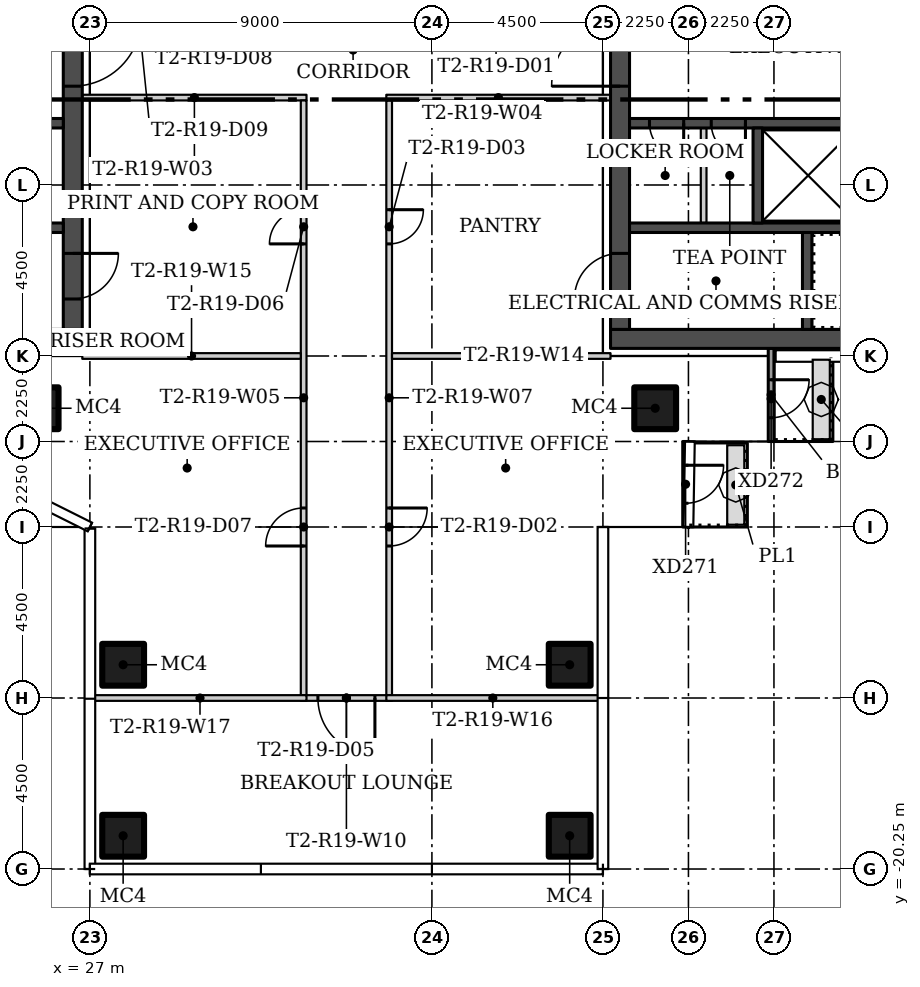
"""IFC4 building model, lengths in metres.
Left out: names, types, materials, properties, quantities, classifications, styles, units other than length and angle.
Written with IfcOpenShell. Run it as: python <this file> out.ifc"""

import sys

from ifc_helpers import new_model, si_unit, direction, frame, frame_2d, origin, origin_2d, place, context, subcontext, project, spatial, rectangle, hollow_rectangle, extrude, element, fill, save


model = new_model("IFC4")
c1 = context("Model", 3, precision=1e-05, world=origin(), true_north=direction((0.0, 1.0)))
c2 = subcontext(c1, "Body", "Model", "MODEL_VIEW")
j1 = project(units=[si_unit("LENGTHUNIT", "METRE"), si_unit("PLANEANGLEUNIT", "RADIAN")], contexts=[c1])
p1 = place(None, origin())
s1 = spatial("IfcSite", under=j1, at=p1, CompositionType="ELEMENT")
p2 = place(p1, origin())
s2 = spatial("IfcBuilding", under=s1, at=p2, CompositionType="ELEMENT")
p3 = place(p2, frame((0.0, 0.0, 174.0)))
s3 = spatial("IfcBuildingStorey", under=s2, at=p3, CompositionType="ELEMENT", Elevation=174.0)
for number, where in (
    (1, (25.625, -8.125, 0.0)),
    (2, (41.875, -8.125, 0.0)),
    (3, (39.625, -14.875, 0.0)),
    (4, (39.625, -19.375, 0.0)),
    (5, (27.875, -14.875, 0.0)),
    (6, (27.875, -19.375, 0.0)),
):
    element("IfcColumn", number, at=place(p3, frame(where)), inside=s3, PredefinedType="COLUMN", context=c2, shape_type="SweptSolid", body=[
        extrude(hollow_rectangle(XDim=1.1, YDim=1.1, WallThickness=0.04, at=origin_2d()), origin(), (0.0, 0.0, 1.0), 3.45),
    ])
for number, where, z_axis, x_axis in (
    (7, (32.7, 0.05, 0.0), (0.0, 0.0, 1.0), (-1.0, 0.0, 0.0)),
    (8, (40.7, 0.05, 0.0), (0.0, 0.0, 1.0), (-1.0, 0.0, 0.0)),
):
    element("IfcWall", number, at=place(p3, frame(where, z_axis=z_axis, x_axis=x_axis)), inside=s3, PredefinedType="PARTITIONING", context=c2, shape_type="SweptSolid", body=[
        extrude(rectangle(XDim=5.9, YDim=0.15, at=frame_2d((2.95, 0.0))), origin(), (0.0, 0.0, 1.0), 3.45),
    ])
p4 = place(p3, frame((32.625, -15.675, 0.0), z_axis=(0.0, 0.0, 1.0), x_axis=(0.0, 1.0, 0.0)))
e9 = element("IfcWall", 9, at=p4, inside=s3, PredefinedType="PARTITIONING", context=c2, shape_type="SweptSolid", body=[
    extrude(rectangle(XDim=15.65, YDim=0.15, at=frame_2d((7.825, 0.0))), origin(), (0.0, 0.0, 1.0), 3.45),
])
p5 = place(p4, frame((11.875, 0.0, 0.0)))
e10 = element("IfcOpeningElement", 10, at=p5, cuts=e9, PredefinedType="OPENING", context=c2, shape_type="SweptSolid", body=[
    extrude(rectangle(XDim=0.9, YDim=2.1, at=frame_2d((0.45, 1.05))), frame((0.0, 0.085, 0.0), z_axis=(0.0, -1.0, 0.0), x_axis=(1.0, 0.0, 0.0)), (0.0, 0.0, 1.0), 0.17),
])
p6 = place(p4, frame((3.925, 0.0, 0.0)))
e11 = element("IfcOpeningElement", 11, at=p6, cuts=e9, PredefinedType="OPENING", context=c2, shape_type="SweptSolid", body=[
    extrude(rectangle(XDim=1.0, YDim=2.4, at=frame_2d((0.5, 1.2))), frame((0.0, 0.085, 0.0), z_axis=(0.0, -1.0, 0.0), x_axis=(1.0, 0.0, 0.0)), (0.0, 0.0, 1.0), 0.17),
])
p7 = place(p3, frame((34.875, -0.025, 0.0), z_axis=(0.0, 0.0, 1.0), x_axis=(0.0, -1.0, 0.0)))
e12 = element("IfcWall", 12, at=p7, inside=s3, PredefinedType="PARTITIONING", context=c2, shape_type="SweptSolid", body=[
    extrude(rectangle(XDim=15.65, YDim=0.15, at=frame_2d((7.825, 0.0))), origin(), (0.0, 0.0, 1.0), 3.45),
])
p8 = place(p7, frame((10.725, 0.0, 0.0)))
e13 = element("IfcOpeningElement", 13, at=p8, cuts=e12, PredefinedType="OPENING", context=c2, shape_type="SweptSolid", body=[
    extrude(rectangle(XDim=1.0, YDim=2.4, at=frame_2d((0.5, 1.2))), frame((0.0, 0.085, 0.0), z_axis=(0.0, -1.0, 0.0), x_axis=(1.0, 0.0, 0.0)), (0.0, 0.0, 1.0), 0.17),
])
p9 = place(p7, frame((2.875, 0.0, 0.0)))
e14 = element("IfcOpeningElement", 14, at=p9, cuts=e12, PredefinedType="OPENING", context=c2, shape_type="SweptSolid", body=[
    extrude(rectangle(XDim=0.9, YDim=2.1, at=frame_2d((0.45, 1.05))), frame((0.0, 0.085, 0.0), z_axis=(0.0, -1.0, 0.0), x_axis=(1.0, 0.0, 0.0)), (0.0, 0.0, 1.0), 0.17),
])
p10 = place(p3, frame((34.95, -15.75, 0.0), z_axis=(0.0, 0.0, 1.0), x_axis=(-1.0, 0.0, 0.0)))
e15 = element("IfcWall", 15, at=p10, inside=s3, PredefinedType="PARTITIONING", context=c2, shape_type="SweptSolid", body=[
    extrude(rectangle(XDim=2.4, YDim=0.15, at=frame_2d((1.2, 0.0))), origin(), (0.0, 0.0, 1.0), 3.45),
])
p11 = place(p10, frame((0.45, 0.0, 0.0)))
e16 = element("IfcOpeningElement", 16, at=p11, cuts=e15, PredefinedType="OPENING", context=c2, shape_type="SweptSolid", body=[
    extrude(rectangle(XDim=1.5, YDim=2.1, at=frame_2d((0.75, 1.05))), frame((0.0, 0.085, 0.0), z_axis=(0.0, -1.0, 0.0), x_axis=(1.0, 0.0, 0.0)), (0.0, 0.0, 1.0), 0.17),
])
for number, where in (
    (17, (34.95, -6.75, 0.0)),
    (18, (26.8, -6.75, 0.0)),
):
    element("IfcWall", number, at=place(p3, frame(where)), inside=s3, PredefinedType="PARTITIONING", context=c2, shape_type="SweptSolid", body=[
        extrude(rectangle(XDim=5.75, YDim=0.15, at=frame_2d((2.875, 0.0))), origin(), (0.0, 0.0, 1.0), 3.45),
    ])
for number, where in (
    (19, (34.8, -15.75, 0.0)),
    (20, (27.095, -15.75, 0.0)),
):
    element("IfcWall", number, at=place(p3, frame(where)), inside=s3, PredefinedType="PARTITIONING", context=c2, shape_type="SweptSolid", body=[
        extrude(rectangle(XDim=5.605, YDim=0.15, at=frame_2d((2.802, 0.0))), origin(), (0.0, 0.0, 1.0), 3.45),
    ])
p12 = place(p3, frame((42.675, -9.0, 0.0), z_axis=(0.0, 0.0, 1.0), x_axis=(0.0, -1.0, 0.0)))
e21 = element("IfcWall", 21, at=p12, inside=s3, PredefinedType="SOLIDWALL", context=c2, shape_type="SweptSolid", body=[
    extrude(rectangle(XDim=2.25, YDim=0.15, at=frame_2d((1.125, 0.0))), origin(), (0.0, 0.0, 1.0), 3.45),
])
p13 = place(p12, frame((0.625, 0.0, 0.0)))
e22 = element("IfcOpeningElement", 22, at=p13, cuts=e21, PredefinedType="OPENING", context=c2, shape_type="SweptSolid", body=[
    extrude(rectangle(XDim=1.0, YDim=2.4, at=frame_2d((0.5, 1.2))), frame((0.0, 0.085, 0.0), z_axis=(0.0, -1.0, 0.0), x_axis=(1.0, 0.0, 0.0)), (0.0, 0.0, 1.0), 0.17),
])
p14 = place(p3, frame((44.925, -6.543, 0.0), z_axis=(0.0, 0.0, 1.0), x_axis=(0.0, -1.0, 0.0)))
e23 = element("IfcWall", 23, at=p14, inside=s3, PredefinedType="SOLIDWALL", context=c2, shape_type="SweptSolid", body=[
    extrude(rectangle(XDim=2.457, YDim=0.15, at=frame_2d((1.229, 0.0))), origin(), (0.0, 0.0, 1.0), 3.45),
])
p15 = place(p14, frame((0.832, 0.0, 0.0)))
e24 = element("IfcOpeningElement", 24, at=p15, cuts=e23, PredefinedType="OPENING", context=c2, shape_type="SweptSolid", body=[
    extrude(rectangle(XDim=1.0, YDim=2.4, at=frame_2d((0.5, 1.2))), frame((0.0, 0.085, 0.0), z_axis=(0.0, -1.0, 0.0), x_axis=(1.0, 0.0, 0.0)), (0.0, 0.0, 1.0), 0.17),
])
p16 = place(p3, frame((13.7, -6.3, 0.0)))
e25 = element("IfcWall", 25, at=p16, inside=s3, PredefinedType="SHEAR", context=c2, shape_type="SweptSolid", body=[
    extrude(rectangle(XDim=13.1, YDim=0.5, at=frame_2d((6.55, 0.0))), origin(), (0.0, 0.0, 1.0), 3.45),
])
p17 = place(p3, frame((26.55, 6.05, 0.0), z_axis=(0.0, 0.0, 1.0), x_axis=(0.0, -1.0, 0.0)))
e26 = element("IfcWall", 26, at=p17, inside=s3, PredefinedType="SHEAR", context=c2, shape_type="SweptSolid", body=[
    extrude(rectangle(XDim=12.1, YDim=0.5, at=frame_2d((6.05, 0.0))), origin(), (0.0, 0.0, 1.0), 3.45),
])
p18 = place(p17, frame((10.1, 0.0, 0.0)))
e27 = element("IfcOpeningElement", 27, at=p18, cuts=e26, PredefinedType="OPENING", context=c2, shape_type="SweptSolid", body=[
    extrude(rectangle(XDim=1.2, YDim=2.1, at=frame_2d((0.6, 1.05))), frame((0.0, 0.26, 0.0), z_axis=(0.0, -1.0, 0.0), x_axis=(1.0, 0.0, 0.0)), (0.0, 0.0, 1.0), 0.52),
])
p19 = place(p17, frame((3.9, 0.0, 0.0)))
e28 = element("IfcOpeningElement", 28, at=p19, cuts=e26, PredefinedType="OPENING", context=c2, shape_type="SweptSolid", body=[
    extrude(rectangle(XDim=1.8, YDim=2.4, at=frame_2d((0.9, 1.2))), frame((0.0, 0.26, 0.0), z_axis=(0.0, -1.0, 0.0), x_axis=(1.0, 0.0, 0.0)), (0.0, 0.0, 1.0), 0.52),
])
p20 = place(p3, frame((26.3, -3.375, 0.0), z_axis=(0.0, 0.0, 1.0), x_axis=(-1.0, 0.0, 0.0)))
e29 = element("IfcWall", 29, at=p20, inside=s3, PredefinedType="SHEAR", context=c2, shape_type="SweptSolid", body=[
    extrude(rectangle(XDim=12.1, YDim=0.25, at=frame_2d((6.05, 0.0))), origin(), (0.0, 0.0, 1.0), 3.45),
])
p21 = place(p20, frame((10.95, 0.0, 0.0)))
e30 = element("IfcOpeningElement", 30, at=p21, cuts=e29, PredefinedType="OPENING", context=c2, shape_type="SweptSolid", body=[
    extrude(rectangle(XDim=1.1, YDim=2.1, at=frame_2d((0.55, 1.05))), frame((0.0, 0.135, 0.0), z_axis=(0.0, -1.0, 0.0), x_axis=(1.0, 0.0, 0.0)), (0.0, 0.0, 1.0), 0.27),
])
p22 = place(p3, frame((26.3, -0.625, 0.0), z_axis=(0.0, 0.0, 1.0), x_axis=(-1.0, 0.0, 0.0)))
e31 = element("IfcWall", 31, at=p22, inside=s3, PredefinedType="SHEAR", context=c2, shape_type="SweptSolid", body=[
    extrude(rectangle(XDim=12.1, YDim=0.25, at=frame_2d((6.05, 0.0))), origin(), (0.0, 0.0, 1.0), 3.45),
])
p23 = place(p22, frame((8.65, 0.0, 0.0)))
e32 = element("IfcOpeningElement", 32, at=p23, cuts=e31, PredefinedType="OPENING", context=c2, shape_type="SweptSolid", body=[
    extrude(rectangle(XDim=1.2, YDim=2.1, at=frame_2d((0.6, 1.05))), frame((0.0, 0.135, 0.0), z_axis=(0.0, -1.0, 0.0), x_axis=(1.0, 0.0, 0.0)), (0.0, 0.0, 1.0), 0.27),
])
p24 = place(p22, frame((2.0, 0.0, 0.0)))
e33 = element("IfcOpeningElement", 33, at=p24, cuts=e31, PredefinedType="OPENING", context=c2, shape_type="SweptSolid", body=[
    extrude(rectangle(XDim=0.9, YDim=2.1, at=frame_2d((0.45, 1.05))), frame((0.0, 0.135, 0.0), z_axis=(0.0, -1.0, 0.0), x_axis=(1.0, 0.0, 0.0)), (0.0, 0.0, 1.0), 0.27),
])
p25 = place(p22, frame((0.375, 0.0, 0.0)))
e34 = element("IfcOpeningElement", 34, at=p25, cuts=e31, PredefinedType="OPENING", context=c2, shape_type="SweptSolid", body=[
    extrude(rectangle(XDim=0.9, YDim=2.1, at=frame_2d((0.45, 1.05))), frame((0.0, 0.135, 0.0), z_axis=(0.0, -1.0, 0.0), x_axis=(1.0, 0.0, 0.0)), (0.0, 0.0, 1.0), 0.27),
])
p26 = place(p3, frame((53.8, -6.3, 0.0), z_axis=(0.0, 0.0, 1.0), x_axis=(-1.0, 0.0, 0.0)))
e35 = element("IfcWall", 35, at=p26, inside=s3, PredefinedType="SHEAR", context=c2, shape_type="SweptSolid", body=[
    extrude(rectangle(XDim=13.1, YDim=0.5, at=frame_2d((6.55, 0.0))), origin(), (0.0, 0.0, 1.0), 3.45),
])
p27 = place(p3, frame((40.95, -6.05, 0.0), z_axis=(0.0, 0.0, 1.0), x_axis=(0.0, 1.0, 0.0)))
e36 = element("IfcWall", 36, at=p27, inside=s3, PredefinedType="SHEAR", context=c2, shape_type="SweptSolid", body=[
    extrude(rectangle(XDim=12.1, YDim=0.5, at=frame_2d((6.05, 0.0))), origin(), (0.0, 0.0, 1.0), 3.45),
])
p28 = place(p27, frame((0.8, 0.0, 0.0)))
e37 = element("IfcOpeningElement", 37, at=p28, cuts=e36, PredefinedType="OPENING", context=c2, shape_type="SweptSolid", body=[
    extrude(rectangle(XDim=1.2, YDim=2.1, at=frame_2d((0.6, 1.05))), frame((0.0, 0.26, 0.0), z_axis=(0.0, -1.0, 0.0), x_axis=(1.0, 0.0, 0.0)), (0.0, 0.0, 1.0), 0.52),
])
p29 = place(p27, frame((6.4, 0.0, 0.0)))
e38 = element("IfcOpeningElement", 38, at=p29, cuts=e36, PredefinedType="OPENING", context=c2, shape_type="SweptSolid", body=[
    extrude(rectangle(XDim=1.8, YDim=2.4, at=frame_2d((0.9, 1.2))), frame((0.0, 0.26, 0.0), z_axis=(0.0, -1.0, 0.0), x_axis=(1.0, 0.0, 0.0)), (0.0, 0.0, 1.0), 0.52),
])
p30 = place(p3, frame((53.3, -3.375, 0.0), z_axis=(0.0, 0.0, 1.0), x_axis=(-1.0, 0.0, 0.0)))
e39 = element("IfcWall", 39, at=p30, inside=s3, PredefinedType="SHEAR", context=c2, shape_type="SweptSolid", body=[
    extrude(rectangle(XDim=12.1, YDim=0.25, at=frame_2d((6.05, 0.0))), origin(), (0.0, 0.0, 1.0), 3.45),
])
p31 = place(p30, frame((0.05, 0.0, 0.0)))
e40 = element("IfcOpeningElement", 40, at=p31, cuts=e39, PredefinedType="OPENING", context=c2, shape_type="SweptSolid", body=[
    extrude(rectangle(XDim=1.1, YDim=2.1, at=frame_2d((0.55, 1.05))), frame((0.0, 0.135, 0.0), z_axis=(0.0, -1.0, 0.0), x_axis=(1.0, 0.0, 0.0)), (0.0, 0.0, 1.0), 0.27),
])
p32 = place(p3, frame((45.875, -6.05, 0.0), z_axis=(0.0, 0.0, 1.0), x_axis=(0.0, 1.0, 0.0)))
e41 = element("IfcWall", 41, at=p32, inside=s3, PredefinedType="SHEAR", context=c2, shape_type="SweptSolid", body=[
    extrude(rectangle(XDim=2.55, YDim=0.25, at=frame_2d((1.275, 0.0))), origin(), (0.0, 0.0, 1.0), 3.45),
])
p33 = place(p3, frame((53.3, -0.625, 0.0), z_axis=(0.0, 0.0, 1.0), x_axis=(-1.0, 0.0, 0.0)))
e42 = element("IfcWall", 42, at=p33, inside=s3, PredefinedType="SHEAR", context=c2, shape_type="SweptSolid", body=[
    extrude(rectangle(XDim=12.1, YDim=0.25, at=frame_2d((6.05, 0.0))), origin(), (0.0, 0.0, 1.0), 3.45),
])
p34 = place(p33, frame((2.25, 0.0, 0.0)))
e43 = element("IfcOpeningElement", 43, at=p34, cuts=e42, PredefinedType="OPENING", context=c2, shape_type="SweptSolid", body=[
    extrude(rectangle(XDim=1.2, YDim=2.1, at=frame_2d((0.6, 1.05))), frame((0.0, 0.135, 0.0), z_axis=(0.0, -1.0, 0.0), x_axis=(1.0, 0.0, 0.0)), (0.0, 0.0, 1.0), 0.27),
])
p35 = place(p33, frame((9.05, 0.0, 0.0)))
e44 = element("IfcOpeningElement", 44, at=p35, cuts=e42, PredefinedType="OPENING", context=c2, shape_type="SweptSolid", body=[
    extrude(rectangle(XDim=0.9, YDim=2.1, at=frame_2d((0.45, 1.05))), frame((0.0, 0.135, 0.0), z_axis=(0.0, -1.0, 0.0), x_axis=(1.0, 0.0, 0.0)), (0.0, 0.0, 1.0), 0.27),
])
p36 = place(p33, frame((10.675, 0.0, 0.0)))
e45 = element("IfcOpeningElement", 45, at=p36, cuts=e42, PredefinedType="OPENING", context=c2, shape_type="SweptSolid", body=[
    extrude(rectangle(XDim=0.9, YDim=2.1, at=frame_2d((0.45, 1.05))), frame((0.0, 0.135, 0.0), z_axis=(0.0, -1.0, 0.0), x_axis=(1.0, 0.0, 0.0)), (0.0, 0.0, 1.0), 0.27),
])
p37 = place(p3, frame((44.575, -3.25, 0.0), z_axis=(0.0, 0.0, 1.0), x_axis=(0.0, 1.0, 0.0)))
e46 = element("IfcWall", 46, at=p37, inside=s3, PredefinedType="SHEAR", context=c2, shape_type="SweptSolid", body=[
    extrude(rectangle(XDim=2.5, YDim=0.25, at=frame_2d((1.25, 0.0))), origin(), (0.0, 0.0, 1.0), 3.45),
])
p38 = place(p3, frame((43.15, -3.25, 0.0), z_axis=(0.0, 0.0, 1.0), x_axis=(0.0, 1.0, 0.0)))
e47 = element("IfcWall", 47, at=p38, inside=s3, PredefinedType="PARTITIONING", context=c2, shape_type="SweptSolid", body=[
    extrude(rectangle(XDim=2.5, YDim=0.15, at=frame_2d((1.25, 0.0))), origin(), (0.0, 0.0, 1.0), 3.45),
])
p39 = place(p8, origin())
e48 = element("IfcDoor", 48, at=p39, inside=s3, OperationType="SINGLE_SWING_RIGHT", PredefinedType="DOOR", context=c2, shape_type="SweptSolid", body=[
    extrude(rectangle(XDim=1.0, YDim=2.4, at=frame_2d((0.5, 1.2))), frame((0.0, 0.025, 0.0), z_axis=(0.0, -1.0, 0.0), x_axis=(1.0, 0.0, 0.0)), (0.0, 0.0, 1.0), 0.05),
])
fill(e13, e48)
p40 = place(p9, origin())
e49 = element("IfcDoor", 49, at=p40, inside=s3, OperationType="SINGLE_SWING_LEFT", PredefinedType="DOOR", context=c2, shape_type="SweptSolid", body=[
    extrude(rectangle(XDim=0.9, YDim=2.1, at=frame_2d((0.45, 1.05))), frame((0.0, 0.025, 0.0), z_axis=(0.0, -1.0, 0.0), x_axis=(1.0, 0.0, 0.0)), (0.0, 0.0, 1.0), 0.05),
])
fill(e14, e49)
p41 = place(p11, origin())
e50 = element("IfcDoor", 50, at=p41, inside=s3, OperationType="DOUBLE_DOOR_SINGLE_SWING", PredefinedType="DOOR", context=c2, shape_type="SweptSolid", body=[
    extrude(rectangle(XDim=1.5, YDim=2.1, at=frame_2d((0.75, 1.05))), frame((0.0, 0.025, 0.0), z_axis=(0.0, -1.0, 0.0), x_axis=(1.0, 0.0, 0.0)), (0.0, 0.0, 1.0), 0.05),
])
fill(e16, e50)
p42 = place(p5, origin())
e51 = element("IfcDoor", 51, at=p42, inside=s3, OperationType="SINGLE_SWING_RIGHT", PredefinedType="DOOR", context=c2, shape_type="SweptSolid", body=[
    extrude(rectangle(XDim=0.9, YDim=2.1, at=frame_2d((0.45, 1.05))), frame((0.0, 0.025, 0.0), z_axis=(0.0, -1.0, 0.0), x_axis=(1.0, 0.0, 0.0)), (0.0, 0.0, 1.0), 0.05),
])
fill(e10, e51)
p43 = place(p6, origin())
e52 = element("IfcDoor", 52, at=p43, inside=s3, OperationType="SINGLE_SWING_LEFT", PredefinedType="DOOR", context=c2, shape_type="SweptSolid", body=[
    extrude(rectangle(XDim=1.0, YDim=2.4, at=frame_2d((0.5, 1.2))), frame((0.0, 0.025, 0.0), z_axis=(0.0, -1.0, 0.0), x_axis=(1.0, 0.0, 0.0)), (0.0, 0.0, 1.0), 0.05),
])
fill(e11, e52)
p44 = place(p13, origin())
e53 = element("IfcDoor", 53, at=p44, inside=s3, OperationType="SINGLE_SWING_LEFT", PredefinedType="DOOR", context=c2, shape_type="SweptSolid", body=[
    extrude(rectangle(XDim=1.0, YDim=2.4, at=frame_2d((0.5, 1.2))), frame((0.0, 0.025, 0.0), z_axis=(0.0, -1.0, 0.0), x_axis=(1.0, 0.0, 0.0)), (0.0, 0.0, 1.0), 0.05),
])
fill(e22, e53)
p45 = place(p15, origin())
e54 = element("IfcDoor", 54, at=p45, inside=s3, OperationType="SINGLE_SWING_RIGHT", PredefinedType="DOOR", context=c2, shape_type="SweptSolid", body=[
    extrude(rectangle(XDim=1.0, YDim=2.4, at=frame_2d((0.5, 1.2))), frame((0.0, 0.025, 0.0), z_axis=(0.0, -1.0, 0.0), x_axis=(1.0, 0.0, 0.0)), (0.0, 0.0, 1.0), 0.05),
])
fill(e24, e54)
p46 = place(p18, origin())
e55 = element("IfcDoor", 55, at=p46, inside=s3, OperationType="SINGLE_SWING_RIGHT", PredefinedType="DOOR", context=c2, shape_type="SweptSolid", body=[
    extrude(rectangle(XDim=1.2, YDim=2.1, at=frame_2d((0.6, 1.05))), frame((0.0, 0.025, 0.0), z_axis=(0.0, -1.0, 0.0), x_axis=(1.0, 0.0, 0.0)), (0.0, 0.0, 1.0), 0.05),
])
fill(e27, e55)
p47 = place(p19, origin())
e56 = element("IfcDoor", 56, at=p47, inside=s3, OperationType="DOUBLE_DOOR_SINGLE_SWING", PredefinedType="DOOR", context=c2, shape_type="SweptSolid", body=[
    extrude(rectangle(XDim=1.8, YDim=2.4, at=frame_2d((0.9, 1.2))), frame((0.0, 0.025, 0.0), z_axis=(0.0, -1.0, 0.0), x_axis=(1.0, 0.0, 0.0)), (0.0, 0.0, 1.0), 0.05),
])
fill(e28, e56)
p48 = place(p28, origin())
e57 = element("IfcDoor", 57, at=p48, inside=s3, OperationType="SINGLE_SWING_LEFT", PredefinedType="DOOR", context=c2, shape_type="SweptSolid", body=[
    extrude(rectangle(XDim=1.2, YDim=2.1, at=frame_2d((0.6, 1.05))), frame((0.0, 0.025, 0.0), z_axis=(0.0, -1.0, 0.0), x_axis=(1.0, 0.0, 0.0)), (0.0, 0.0, 1.0), 0.05),
])
fill(e37, e57)
p49 = place(p29, origin())
e58 = element("IfcDoor", 58, at=p49, inside=s3, OperationType="DOUBLE_DOOR_SINGLE_SWING", PredefinedType="DOOR", context=c2, shape_type="SweptSolid", body=[
    extrude(rectangle(XDim=1.8, YDim=2.4, at=frame_2d((0.9, 1.2))), frame((0.0, 0.025, 0.0), z_axis=(0.0, -1.0, 0.0), x_axis=(1.0, 0.0, 0.0)), (0.0, 0.0, 1.0), 0.05),
])
fill(e38, e58)
p50 = place(p35, origin())
e59 = element("IfcDoor", 59, at=p50, inside=s3, OperationType="SINGLE_SWING_RIGHT", PredefinedType="DOOR", context=c2, shape_type="SweptSolid", body=[
    extrude(rectangle(XDim=0.9, YDim=2.1, at=frame_2d((0.45, 1.05))), frame((0.0, 0.025, 0.0), z_axis=(0.0, -1.0, 0.0), x_axis=(1.0, 0.0, 0.0)), (0.0, 0.0, 1.0), 0.05),
])
fill(e44, e59)
p51 = place(p36, origin())
e60 = element("IfcDoor", 60, at=p51, inside=s3, OperationType="SINGLE_SWING_RIGHT", PredefinedType="DOOR", context=c2, shape_type="SweptSolid", body=[
    extrude(rectangle(XDim=0.9, YDim=2.1, at=frame_2d((0.45, 1.05))), frame((0.0, 0.025, 0.0), z_axis=(0.0, -1.0, 0.0), x_axis=(1.0, 0.0, 0.0)), (0.0, 0.0, 1.0), 0.05),
])
fill(e45, e60)
save(model, sys.argv[1])
